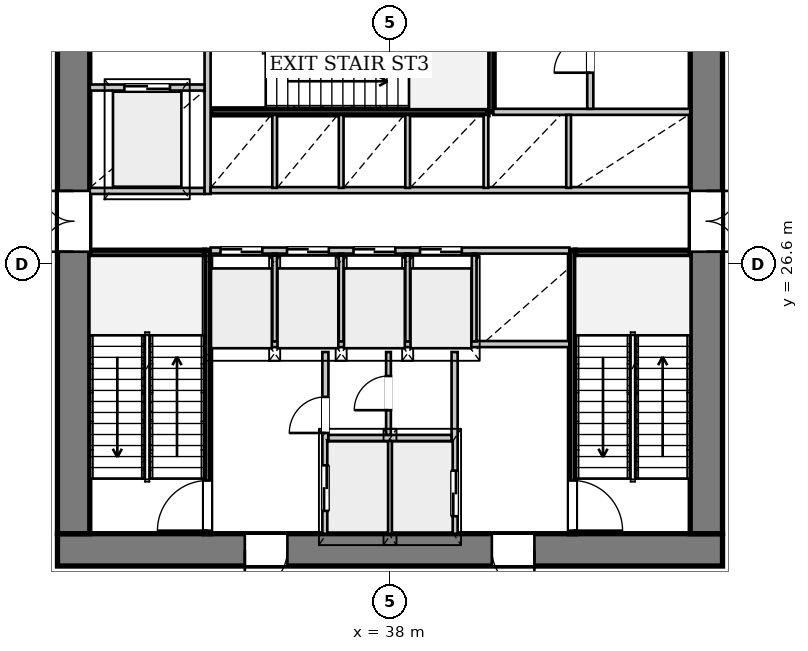
"""IFC4 building model, lengths in metres.
Left out: names, types, materials, properties, quantities, classifications, styles, units other than length and angle.
Written with IfcOpenShell. Run it as: python <this file> out.ifc"""

import sys

from ifc_helpers import new_model, si_unit, direction, frame, frame_2d, origin, place, context, subcontext, project, spatial, rectangle, extrude, source, transform, mapped, element, fill, save


model = new_model("IFC4")
c1 = context("Model", 3, precision=1e-05, world=origin(), true_north=direction((0.0, 1.0)))
c2 = subcontext(c1, "Body", "Model", "MODEL_VIEW")
j1 = project(units=[si_unit("LENGTHUNIT", "METRE"), si_unit("PLANEANGLEUNIT", "RADIAN")], contexts=[c1])
p1 = place(None, origin())
s1 = spatial("IfcSite", under=j1, at=p1, CompositionType="ELEMENT")
p2 = place(p1, origin())
s2 = spatial("IfcBuilding", under=s1, at=p2, CompositionType="ELEMENT")
p3 = place(p2, frame((0.0, 0.0, 24.6)))
s3 = spatial("IfcBuildingStorey", under=s2, at=p3, CompositionType="ELEMENT", Elevation=24.6)
p4 = place(p3, frame((46.75, 19.075, 0.0), z_axis=(0.0, 0.0, 1.0), x_axis=(-1.0, 0.0, 0.0)))
e1 = element("IfcWall", 1, at=p4, inside=s3, PredefinedType="SHEAR", context=c2, shape_type="SweptSolid", body=[
    extrude(rectangle(XDim=17.5, YDim=0.85, at=frame_2d((8.75, 0.0))), origin(), (0.0, 0.0, 1.0), 4.45),
])
p5 = place(p4, frame((4.95, 0.0, 0.0)))
e2 = element("IfcOpeningElement", 2, at=p5, cuts=e1, PredefinedType="OPENING", context=c2, shape_type="SweptSolid", body=[
    extrude(rectangle(XDim=1.12, YDim=2.25, at=frame_2d((0.56, 1.125))), frame((0.0, 0.435, 0.0), z_axis=(0.0, -1.0, 0.0), x_axis=(1.0, 0.0, 0.0)), (0.0, 0.0, 1.0), 0.87),
])
p6 = place(p4, frame((11.45, 0.0, 0.0)))
e3 = element("IfcOpeningElement", 3, at=p6, cuts=e1, PredefinedType="OPENING", context=c2, shape_type="SweptSolid", body=[
    extrude(rectangle(XDim=1.12, YDim=2.25, at=frame_2d((0.56, 1.125))), frame((0.0, 0.435, 0.0), z_axis=(0.0, -1.0, 0.0), x_axis=(1.0, 0.0, 0.0)), (0.0, 0.0, 1.0), 0.87),
])
p7 = place(p3, frame((29.675, 19.5, 0.0), z_axis=(0.0, 0.0, 1.0), x_axis=(0.0, 1.0, 0.0)))
e4 = element("IfcWall", 4, at=p7, inside=s3, PredefinedType="SHEAR", context=c2, shape_type="SweptSolid", body=[
    extrude(rectangle(XDim=14.2, YDim=0.85, at=frame_2d((7.1, 0.0))), origin(), (0.0, 0.0, 1.0), 4.45),
])
p8 = place(p7, frame((7.42, 0.0, 0.0)))
e5 = element("IfcOpeningElement", 5, at=p8, cuts=e4, PredefinedType="OPENING", context=c2, shape_type="SweptSolid", body=[
    extrude(rectangle(XDim=1.6, YDim=2.2, at=frame_2d((0.8, 1.1))), frame((0.0, 0.435, 0.0), z_axis=(0.0, -1.0, 0.0), x_axis=(1.0, 0.0, 0.0)), (0.0, 0.0, 1.0), 0.87),
])
p9 = place(p3, frame((46.325, 33.7, 0.0), z_axis=(0.0, 0.0, 1.0), x_axis=(0.0, -1.0, 0.0)))
e6 = element("IfcWall", 6, at=p9, inside=s3, PredefinedType="SHEAR", context=c2, shape_type="SweptSolid", body=[
    extrude(rectangle(XDim=14.2, YDim=0.85, at=frame_2d((7.1, 0.0))), origin(), (0.0, 0.0, 1.0), 4.45),
])
p10 = place(p9, frame((5.18, 0.0, 0.0)))
e7 = element("IfcOpeningElement", 7, at=p10, cuts=e6, PredefinedType="OPENING", context=c2, shape_type="SweptSolid", body=[
    extrude(rectangle(XDim=1.6, YDim=2.2, at=frame_2d((0.8, 1.1))), frame((0.0, 0.435, 0.0), z_axis=(0.0, -1.0, 0.0), x_axis=(1.0, 0.0, 0.0)), (0.0, 0.0, 1.0), 0.87),
])
p11 = place(p3, frame((33.2, 19.5, 0.0), z_axis=(0.0, 0.0, 1.0), x_axis=(0.0, 1.0, 0.0)))
e8 = element("IfcWall", 8, at=p11, inside=s3, PredefinedType="PARTITIONING", context=c2, shape_type="SweptSolid", body=[
    extrude(rectangle(XDim=7.46, YDim=0.16, at=frame_2d((3.73, 0.0))), origin(), (0.0, 0.0, 1.0), 4.45),
])
p12 = place(p11, frame((0.08, 0.0, 0.0)))
e9 = element("IfcOpeningElement", 9, at=p12, cuts=e8, PredefinedType="OPENING", context=c2, shape_type="SweptSolid", body=[
    extrude(rectangle(XDim=1.32, YDim=2.2, at=frame_2d((0.66, 1.1))), frame((0.0, 0.09, 0.0), z_axis=(0.0, -1.0, 0.0), x_axis=(1.0, 0.0, 0.0)), (0.0, 0.0, 1.0), 0.18),
])
p13 = place(p3, frame((30.1, 26.88, 0.0), z_axis=(0.0, 0.0, 1.0), x_axis=(1.0, 0.0, 0.0)))
e10 = element("IfcWall", 10, at=p13, inside=s3, PredefinedType="PARTITIONING", context=c2, shape_type="SweptSolid", body=[
    extrude(rectangle(XDim=3.02, YDim=0.16, at=frame_2d((1.51, 0.0))), origin(), (0.0, 0.0, 1.0), 4.45),
])
p14 = place(p3, frame((42.8, 26.96, 0.0), z_axis=(0.0, 0.0, 1.0), x_axis=(0.0, -1.0, 0.0)))
e11 = element("IfcWall", 11, at=p14, inside=s3, PredefinedType="PARTITIONING", context=c2, shape_type="SweptSolid", body=[
    extrude(rectangle(XDim=7.46, YDim=0.16, at=frame_2d((3.73, 0.0))), origin(), (0.0, 0.0, 1.0), 4.45),
])
p15 = place(p14, frame((6.06, 0.0, 0.0)))
e12 = element("IfcOpeningElement", 12, at=p15, cuts=e11, PredefinedType="OPENING", context=c2, shape_type="SweptSolid", body=[
    extrude(rectangle(XDim=1.32, YDim=2.2, at=frame_2d((0.66, 1.1))), frame((0.0, 0.09, 0.0), z_axis=(0.0, -1.0, 0.0), x_axis=(1.0, 0.0, 0.0)), (0.0, 0.0, 1.0), 0.18),
])
p16 = place(p3, frame((42.88, 26.88, 0.0), z_axis=(0.0, 0.0, 1.0), x_axis=(1.0, 0.0, 0.0)))
e13 = element("IfcWall", 13, at=p16, inside=s3, PredefinedType="PARTITIONING", context=c2, shape_type="SweptSolid", body=[
    extrude(rectangle(XDim=3.02, YDim=0.16, at=frame_2d((1.51, 0.0))), origin(), (0.0, 0.0, 1.0), 4.45),
])
p17 = place(p3, frame((33.28, 30.6, 0.0), z_axis=(0.0, 0.0, 1.0), x_axis=(1.0, 0.0, 0.0)))
e14 = element("IfcWall", 14, at=p17, inside=s3, PredefinedType="PARTITIONING", context=c2, shape_type="SweptSolid", body=[
    extrude(rectangle(XDim=7.3, YDim=0.16, at=frame_2d((3.65, 0.0))), origin(), (0.0, 0.0, 1.0), 4.45),
])
p18 = place(p3, frame((40.66, 30.6, 0.0), z_axis=(0.0, 0.0, 1.0), x_axis=(0.0, 1.0, 0.0)))
e15 = element("IfcWall", 15, at=p18, inside=s3, PredefinedType="PARTITIONING", context=c2, shape_type="SweptSolid", body=[
    extrude(rectangle(XDim=3.1, YDim=0.16, at=frame_2d((1.55, 0.0))), origin(), (0.0, 0.0, 1.0), 4.45),
])
p19 = place(p3, frame((36.3, 19.5, 0.0), z_axis=(0.0, 0.0, 1.0), x_axis=(0.0, 1.0, 0.0)))
e16 = element("IfcWall", 16, at=p19, inside=s3, PredefinedType="PARTITIONING", context=c2, shape_type="SweptSolid", body=[
    extrude(rectangle(XDim=4.78, YDim=0.16, at=frame_2d((2.39, 0.0))), origin(), (0.0, 0.0, 1.0), 4.45),
])
p20 = place(p19, frame((0.6, 0.0, 0.0)))
e17 = element("IfcOpeningElement", 17, at=p20, cuts=e16, PredefinedType="OPENING", context=c2, shape_type="SweptSolid", body=[
    extrude(rectangle(XDim=1.2, YDim=2.2, at=frame_2d((0.6, 1.1))), frame((0.0, 0.09, 0.0), z_axis=(0.0, -1.0, 0.0), x_axis=(1.0, 0.0, 0.0)), (0.0, 0.0, 1.0), 0.18),
])
p21 = place(p19, frame((2.65, 0.0, 0.0)))
e18 = element("IfcOpeningElement", 18, at=p21, cuts=e16, PredefinedType="OPENING", context=c2, shape_type="SweptSolid", body=[
    extrude(rectangle(XDim=0.95, YDim=2.1, at=frame_2d((0.475, 1.05))), frame((0.0, 0.09, 0.0), z_axis=(0.0, -1.0, 0.0), x_axis=(1.0, 0.0, 0.0)), (0.0, 0.0, 1.0), 0.18),
])
p22 = place(p3, frame((39.7, 24.28, 0.0), z_axis=(0.0, 0.0, 1.0), x_axis=(0.0, -1.0, 0.0)))
e19 = element("IfcWall", 19, at=p22, inside=s3, PredefinedType="PARTITIONING", context=c2, shape_type="SweptSolid", body=[
    extrude(rectangle(XDim=4.78, YDim=0.16, at=frame_2d((2.39, 0.0))), origin(), (0.0, 0.0, 1.0), 4.45),
])
p23 = place(p22, frame((3.12, 0.0, 0.0)))
e20 = element("IfcOpeningElement", 20, at=p23, cuts=e19, PredefinedType="OPENING", context=c2, shape_type="SweptSolid", body=[
    extrude(rectangle(XDim=1.2, YDim=2.2, at=frame_2d((0.6, 1.1))), frame((0.0, 0.09, 0.0), z_axis=(0.0, -1.0, 0.0), x_axis=(1.0, 0.0, 0.0)), (0.0, 0.0, 1.0), 0.18),
])
p24 = place(p3, frame((38.0, 19.5, 0.0), z_axis=(0.0, 0.0, 1.0), x_axis=(0.0, 1.0, 0.0)))
e21 = element("IfcWall", 21, at=p24, inside=s3, PredefinedType="PARTITIONING", context=c2, shape_type="SweptSolid", body=[
    extrude(rectangle(XDim=2.46, YDim=0.125, at=frame_2d((1.23, 0.0))), origin(), (0.0, 0.0, 1.0), 4.45),
])
p25 = place(p3, frame((36.38, 22.02, 0.0), z_axis=(0.0, 0.0, 1.0), x_axis=(1.0, 0.0, 0.0)))
e22 = element("IfcWall", 22, at=p25, inside=s3, PredefinedType="PARTITIONING", context=c2, shape_type="SweptSolid", body=[
    extrude(rectangle(XDim=3.24, YDim=0.16, at=frame_2d((1.62, 0.0))), origin(), (0.0, 0.0, 1.0), 4.45),
])
p26 = place(p3, frame((33.28, 24.49, 0.0), z_axis=(0.0, 0.0, 1.0), x_axis=(1.0, 0.0, 0.0)))
e23 = element("IfcWall", 23, at=p26, inside=s3, PredefinedType="PARTITIONING", context=c2, shape_type="SweptSolid", body=[
    extrude(rectangle(XDim=9.44, YDim=0.16, at=frame_2d((4.72, 0.0))), origin(), (0.0, 0.0, 1.0), 4.45),
])
p27 = place(p3, frame((37.96, 22.1, 0.0), z_axis=(0.0, 0.0, 1.0), x_axis=(0.0, 1.0, 0.0)))
e24 = element("IfcWall", 24, at=p27, inside=s3, PredefinedType="PARTITIONING", context=c2, shape_type="SweptSolid", body=[
    extrude(rectangle(XDim=2.18, YDim=0.125, at=frame_2d((1.09, 0.0))), origin(), (0.0, 0.0, 1.0), 4.45),
])
p28 = place(p27, frame((0.65, 0.0, 0.0)))
e25 = element("IfcOpeningElement", 25, at=p28, cuts=e24, PredefinedType="OPENING", context=c2, shape_type="SweptSolid", body=[
    extrude(rectangle(XDim=0.9, YDim=2.1, at=frame_2d((0.45, 1.05))), frame((0.0, 0.073, 0.0), z_axis=(0.0, -1.0, 0.0), x_axis=(1.0, 0.0, 0.0)), (0.0, 0.0, 1.0), 0.145),
])
p29 = place(p3, frame((30.1, 28.52, 0.0), z_axis=(0.0, 0.0, 1.0), x_axis=(1.0, 0.0, 0.0)))
e26 = element("IfcWall", 26, at=p29, inside=s3, PredefinedType="PARTITIONING", context=c2, shape_type="SweptSolid", body=[
    extrude(rectangle(XDim=3.02, YDim=0.16, at=frame_2d((1.51, 0.0))), origin(), (0.0, 0.0, 1.0), 4.45),
])
p30 = place(p3, frame((33.2, 28.44, 0.0), z_axis=(0.0, 0.0, 1.0), x_axis=(0.0, 1.0, 0.0)))
e27 = element("IfcWall", 27, at=p30, inside=s3, PredefinedType="PARTITIONING", context=c2, shape_type="SweptSolid", body=[
    extrude(rectangle(XDim=5.26, YDim=0.16, at=frame_2d((2.63, 0.0))), origin(), (0.0, 0.0, 1.0), 4.45),
])
p31 = place(p3, frame((30.1, 31.24, 0.0), z_axis=(0.0, 0.0, 1.0), x_axis=(1.0, 0.0, 0.0)))
e28 = element("IfcWall", 28, at=p31, inside=s3, PredefinedType="PARTITIONING", context=c2, shape_type="SweptSolid", body=[
    extrude(rectangle(XDim=3.02, YDim=0.16, at=frame_2d((1.51, 0.0))), origin(), (0.0, 0.0, 1.0), 4.45),
])
p32 = place(p31, frame((0.91, 0.0, 0.0)))
e29 = element("IfcOpeningElement", 29, at=p32, cuts=e28, PredefinedType="OPENING", context=c2, shape_type="SweptSolid", body=[
    extrude(rectangle(XDim=1.2, YDim=2.2, at=frame_2d((0.6, 1.1))), frame((0.0, 0.09, 0.0), z_axis=(0.0, -1.0, 0.0), x_axis=(1.0, 0.0, 0.0)), (0.0, 0.0, 1.0), 0.18),
])
p33 = place(p3, frame((33.28, 26.95, 0.0), z_axis=(0.0, 0.0, 1.0), x_axis=(1.0, 0.0, 0.0)))
e30 = element("IfcWall", 30, at=p33, inside=s3, PredefinedType="PARTITIONING", context=c2, shape_type="SweptSolid", body=[
    extrude(rectangle(XDim=9.44, YDim=0.16, at=frame_2d((4.72, 0.0))), origin(), (0.0, 0.0, 1.0), 4.45),
])
p34 = place(p33, frame((0.26, 0.0, 0.0)))
e31 = element("IfcOpeningElement", 31, at=p34, cuts=e30, PredefinedType="OPENING", context=c2, shape_type="SweptSolid", body=[
    extrude(rectangle(XDim=1.1, YDim=2.2, at=frame_2d((0.55, 1.1))), frame((0.0, 0.09, 0.0), z_axis=(0.0, -1.0, 0.0), x_axis=(1.0, 0.0, 0.0)), (0.0, 0.0, 1.0), 0.18),
])
p35 = place(p33, frame((2.01, 0.0, 0.0)))
e32 = element("IfcOpeningElement", 32, at=p35, cuts=e30, PredefinedType="OPENING", context=c2, shape_type="SweptSolid", body=[
    extrude(rectangle(XDim=1.1, YDim=2.2, at=frame_2d((0.55, 1.1))), frame((0.0, 0.09, 0.0), z_axis=(0.0, -1.0, 0.0), x_axis=(1.0, 0.0, 0.0)), (0.0, 0.0, 1.0), 0.18),
])
p36 = place(p33, frame((3.76, 0.0, 0.0)))
e33 = element("IfcOpeningElement", 33, at=p36, cuts=e30, PredefinedType="OPENING", context=c2, shape_type="SweptSolid", body=[
    extrude(rectangle(XDim=1.1, YDim=2.2, at=frame_2d((0.55, 1.1))), frame((0.0, 0.09, 0.0), z_axis=(0.0, -1.0, 0.0), x_axis=(1.0, 0.0, 0.0)), (0.0, 0.0, 1.0), 0.18),
])
p37 = place(p33, frame((5.51, 0.0, 0.0)))
e34 = element("IfcOpeningElement", 34, at=p37, cuts=e30, PredefinedType="OPENING", context=c2, shape_type="SweptSolid", body=[
    extrude(rectangle(XDim=1.1, YDim=2.2, at=frame_2d((0.55, 1.1))), frame((0.0, 0.09, 0.0), z_axis=(0.0, -1.0, 0.0), x_axis=(1.0, 0.0, 0.0)), (0.0, 0.0, 1.0), 0.18),
])
for number, where, z_axis, x_axis in (
    (35, (34.965, 24.56, 0.0), (0.0, 0.0, 1.0), (0.0, 1.0, 0.0)),
    (36, (36.715, 24.56, 0.0), (0.0, 0.0, 1.0), (0.0, 1.0, 0.0)),
    (37, (38.465, 24.56, 0.0), (0.0, 0.0, 1.0), (0.0, 1.0, 0.0)),
    (38, (40.215, 24.56, 0.0), (0.0, 0.0, 1.0), (0.0, 1.0, 0.0)),
):
    element("IfcWall", number, at=place(p3, frame(where, z_axis=z_axis, x_axis=x_axis)), inside=s3, PredefinedType="PARTITIONING", context=c2, shape_type="SweptSolid", body=[
        extrude(rectangle(XDim=2.31, YDim=0.125, at=frame_2d((1.155, 0.0))), origin(), (0.0, 0.0, 1.0), 4.45),
    ])
p38 = place(p3, frame((33.28, 28.54, 0.0), z_axis=(0.0, 0.0, 1.0), x_axis=(1.0, 0.0, 0.0)))
e39 = element("IfcWall", 39, at=p38, inside=s3, PredefinedType="PARTITIONING", context=c2, shape_type="SweptSolid", body=[
    extrude(rectangle(XDim=12.62, YDim=0.16, at=frame_2d((6.31, 0.0))), origin(), (0.0, 0.0, 1.0), 4.45),
])
p39 = place(p3, frame((40.72, 30.6, 0.0), z_axis=(0.0, 0.0, 1.0), x_axis=(1.0, 0.0, 0.0)))
e40 = element("IfcWall", 40, at=p39, inside=s3, PredefinedType="PARTITIONING", context=c2, shape_type="SweptSolid", body=[
    extrude(rectangle(XDim=5.18, YDim=0.16, at=frame_2d((2.59, 0.0))), origin(), (0.0, 0.0, 1.0), 4.45),
])
for number, where, z_axis, x_axis in (
    (41, (34.965, 28.6, 0.0), (0.0, 0.0, 1.0), (0.0, 1.0, 0.0)),
    (42, (36.715, 28.6, 0.0), (0.0, 0.0, 1.0), (0.0, 1.0, 0.0)),
    (43, (38.465, 28.6, 0.0), (0.0, 0.0, 1.0), (0.0, 1.0, 0.0)),
    (44, (40.525, 28.6, 0.0), (0.0, 0.0, 1.0), (0.0, 1.0, 0.0)),
    (45, (42.7, 28.6, 0.0), (0.0, 0.0, 1.0), (0.0, 1.0, 0.0)),
):
    element("IfcWall", number, at=place(p3, frame(where, z_axis=z_axis, x_axis=x_axis)), inside=s3, PredefinedType="PARTITIONING", context=c2, shape_type="SweptSolid", body=[
        extrude(rectangle(XDim=1.92, YDim=0.125, at=frame_2d((0.96, 0.0))), origin(), (0.0, 0.0, 1.0), 4.45),
    ])
p40 = place(p3, frame((43.27, 30.68, 0.0), z_axis=(0.0, 0.0, 1.0), x_axis=(0.0, 1.0, 0.0)))
e46 = element("IfcWall", 46, at=p40, inside=s3, PredefinedType="PARTITIONING", context=c2, shape_type="SweptSolid", body=[
    extrude(rectangle(XDim=3.02, YDim=0.16, at=frame_2d((1.51, 0.0))), origin(), (0.0, 0.0, 1.0), 4.45),
])
p41 = place(p40, frame((0.95, 0.0, 0.0)))
e47 = element("IfcOpeningElement", 47, at=p41, cuts=e46, PredefinedType="OPENING", context=c2, shape_type="SweptSolid", body=[
    extrude(rectangle(XDim=0.95, YDim=2.1, at=frame_2d((0.475, 1.05))), frame((0.0, 0.09, 0.0), z_axis=(0.0, -1.0, 0.0), x_axis=(1.0, 0.0, 0.0)), (0.0, 0.0, 1.0), 0.18),
])
m1 = source(origin(), c2, "Body", "SweptSolid", [
    extrude(rectangle(XDim=1.12, YDim=2.25, at=frame_2d((0.56, 1.125))), frame((0.0, 0.025, 0.0), z_axis=(0.0, -1.0, 0.0), x_axis=(1.0, 0.0, 0.0)), (0.0, 0.0, 1.0), 0.05),
])
p42 = place(p5, origin())
e48 = element("IfcDoor", 48, at=p42, inside=s3, OperationType="SINGLE_SWING_LEFT", PredefinedType="DOOR", context=c2, shape_type="MappedRepresentation", body=[
    mapped(m1, transform((0.0, 0.0, 0.0), x_axis=(1.0, 0.0, 0.0), y_axis=(0.0, 1.0, 0.0), z_axis=(0.0, 0.0, 1.0), scale=1.0)),
])
fill(e2, e48)
p43 = place(p6, origin())
e49 = element("IfcDoor", 49, at=p43, inside=s3, OperationType="SINGLE_SWING_RIGHT", PredefinedType="DOOR", context=c2, shape_type="MappedRepresentation", body=[
    mapped(m1, transform((0.0, 0.0, 0.0), x_axis=(1.0, 0.0, 0.0), y_axis=(0.0, 1.0, 0.0), z_axis=(0.0, 0.0, 1.0), scale=1.0)),
])
fill(e3, e49)
m2 = source(origin(), c2, "Body", "SweptSolid", [
    extrude(rectangle(XDim=1.6, YDim=2.2, at=frame_2d((0.8, 1.1))), frame((0.0, 0.025, 0.0), z_axis=(0.0, -1.0, 0.0), x_axis=(1.0, 0.0, 0.0)), (0.0, 0.0, 1.0), 0.05),
])
p44 = place(p8, origin())
e50 = element("IfcDoor", 50, at=p44, inside=s3, OperationType="DOUBLE_DOOR_SINGLE_SWING", PredefinedType="DOOR", context=c2, shape_type="MappedRepresentation", body=[
    mapped(m2, transform((0.0, 0.0, 0.0), x_axis=(1.0, 0.0, 0.0), y_axis=(0.0, 1.0, 0.0), z_axis=(0.0, 0.0, 1.0), scale=1.0)),
])
fill(e5, e50)
p45 = place(p10, origin())
e51 = element("IfcDoor", 51, at=p45, inside=s3, OperationType="DOUBLE_DOOR_SINGLE_SWING", PredefinedType="DOOR", context=c2, shape_type="MappedRepresentation", body=[
    mapped(m2, transform((0.0, 0.0, 0.0), x_axis=(1.0, 0.0, 0.0), y_axis=(0.0, 1.0, 0.0), z_axis=(0.0, 0.0, 1.0), scale=1.0)),
])
fill(e7, e51)
m3 = source(origin(), c2, "Body", "SweptSolid", [
    extrude(rectangle(XDim=1.32, YDim=2.2, at=frame_2d((0.66, 1.1))), frame((0.0, 0.025, 0.0), z_axis=(0.0, -1.0, 0.0), x_axis=(1.0, 0.0, 0.0)), (0.0, 0.0, 1.0), 0.05),
])
p46 = place(p12, origin())
e52 = element("IfcDoor", 52, at=p46, inside=s3, OperationType="SINGLE_SWING_LEFT", PredefinedType="DOOR", context=c2, shape_type="MappedRepresentation", body=[
    mapped(m3, transform((0.0, 0.0, 0.0), x_axis=(1.0, 0.0, 0.0), y_axis=(0.0, 1.0, 0.0), z_axis=(0.0, 0.0, 1.0), scale=1.0)),
])
fill(e9, e52)
p47 = place(p15, origin())
e53 = element("IfcDoor", 53, at=p47, inside=s3, OperationType="SINGLE_SWING_RIGHT", PredefinedType="DOOR", context=c2, shape_type="MappedRepresentation", body=[
    mapped(m3, transform((0.0, 0.0, 0.0), x_axis=(1.0, 0.0, 0.0), y_axis=(0.0, 1.0, 0.0), z_axis=(0.0, 0.0, 1.0), scale=1.0)),
])
fill(e12, e53)
m4 = source(origin(), c2, "Body", "SweptSolid", [
    extrude(rectangle(XDim=1.2, YDim=2.2, at=frame_2d((0.6, 1.1))), frame((0.0, 0.025, 0.0), z_axis=(0.0, -1.0, 0.0), x_axis=(1.0, 0.0, 0.0)), (0.0, 0.0, 1.0), 0.05),
])
p48 = place(p20, origin())
e54 = element("IfcDoor", 54, at=p48, inside=s3, OperationType="DOUBLE_DOOR_SLIDING", PredefinedType="DOOR", context=c2, shape_type="MappedRepresentation", body=[
    mapped(m4, transform((0.0, 0.0, 0.0), x_axis=(1.0, 0.0, 0.0), y_axis=(0.0, 1.0, 0.0), z_axis=(0.0, 0.0, 1.0), scale=1.0)),
])
fill(e17, e54)
m5 = source(origin(), c2, "Body", "SweptSolid", [
    extrude(rectangle(XDim=0.95, YDim=2.1, at=frame_2d((0.475, 1.05))), frame((0.0, 0.025, 0.0), z_axis=(0.0, -1.0, 0.0), x_axis=(1.0, 0.0, 0.0)), (0.0, 0.0, 1.0), 0.05),
])
p49 = place(p21, origin())
e55 = element("IfcDoor", 55, at=p49, inside=s3, OperationType="SINGLE_SWING_LEFT", PredefinedType="DOOR", context=c2, shape_type="MappedRepresentation", body=[
    mapped(m5, transform((0.0, 0.0, 0.0), x_axis=(1.0, 0.0, 0.0), y_axis=(0.0, 1.0, 0.0), z_axis=(0.0, 0.0, 1.0), scale=1.0)),
])
fill(e18, e55)
m6 = source(origin(), c2, "Body", "SweptSolid", [
    extrude(rectangle(XDim=0.9, YDim=2.1, at=frame_2d((0.45, 1.05))), frame((0.0, 0.025, 0.0), z_axis=(0.0, -1.0, 0.0), x_axis=(1.0, 0.0, 0.0)), (0.0, 0.0, 1.0), 0.05),
])
p50 = place(p28, origin())
e56 = element("IfcDoor", 56, at=p50, inside=s3, OperationType="SINGLE_SWING_LEFT", PredefinedType="DOOR", context=c2, shape_type="MappedRepresentation", body=[
    mapped(m6, transform((0.0, 0.0, 0.0), x_axis=(1.0, 0.0, 0.0), y_axis=(0.0, 1.0, 0.0), z_axis=(0.0, 0.0, 1.0), scale=1.0)),
])
fill(e25, e56)
p51 = place(p23, origin())
e57 = element("IfcDoor", 57, at=p51, inside=s3, OperationType="DOUBLE_DOOR_SLIDING", PredefinedType="DOOR", context=c2, shape_type="MappedRepresentation", body=[
    mapped(m4, transform((0.0, 0.0, 0.0), x_axis=(1.0, 0.0, 0.0), y_axis=(0.0, 1.0, 0.0), z_axis=(0.0, 0.0, 1.0), scale=1.0)),
])
fill(e20, e57)
p52 = place(p32, origin())
e58 = element("IfcDoor", 58, at=p52, inside=s3, OperationType="DOUBLE_DOOR_SLIDING", PredefinedType="DOOR", context=c2, shape_type="MappedRepresentation", body=[
    mapped(m4, transform((0.0, 0.0, 0.0), x_axis=(1.0, 0.0, 0.0), y_axis=(0.0, 1.0, 0.0), z_axis=(0.0, 0.0, 1.0), scale=1.0)),
])
fill(e29, e58)
m7 = source(origin(), c2, "Body", "SweptSolid", [
    extrude(rectangle(XDim=1.1, YDim=2.2, at=frame_2d((0.55, 1.1))), frame((0.0, 0.025, 0.0), z_axis=(0.0, -1.0, 0.0), x_axis=(1.0, 0.0, 0.0)), (0.0, 0.0, 1.0), 0.05),
])
p53 = place(p34, origin())
e59 = element("IfcDoor", 59, at=p53, inside=s3, OperationType="DOUBLE_DOOR_SLIDING", PredefinedType="DOOR", context=c2, shape_type="MappedRepresentation", body=[
    mapped(m7, transform((0.0, 0.0, 0.0), x_axis=(1.0, 0.0, 0.0), y_axis=(0.0, 1.0, 0.0), z_axis=(0.0, 0.0, 1.0), scale=1.0)),
])
fill(e31, e59)
p54 = place(p35, origin())
e60 = element("IfcDoor", 60, at=p54, inside=s3, OperationType="DOUBLE_DOOR_SLIDING", PredefinedType="DOOR", context=c2, shape_type="MappedRepresentation", body=[
    mapped(m7, transform((0.0, 0.0, 0.0), x_axis=(1.0, 0.0, 0.0), y_axis=(0.0, 1.0, 0.0), z_axis=(0.0, 0.0, 1.0), scale=1.0)),
])
fill(e32, e60)
p55 = place(p36, origin())
e61 = element("IfcDoor", 61, at=p55, inside=s3, OperationType="DOUBLE_DOOR_SLIDING", PredefinedType="DOOR", context=c2, shape_type="MappedRepresentation", body=[
    mapped(m7, transform((0.0, 0.0, 0.0), x_axis=(1.0, 0.0, 0.0), y_axis=(0.0, 1.0, 0.0), z_axis=(0.0, 0.0, 1.0), scale=1.0)),
])
fill(e33, e61)
p56 = place(p37, origin())
e62 = element("IfcDoor", 62, at=p56, inside=s3, OperationType="DOUBLE_DOOR_SLIDING", PredefinedType="DOOR", context=c2, shape_type="MappedRepresentation", body=[
    mapped(m7, transform((0.0, 0.0, 0.0), x_axis=(1.0, 0.0, 0.0), y_axis=(0.0, 1.0, 0.0), z_axis=(0.0, 0.0, 1.0), scale=1.0)),
])
fill(e34, e62)
p57 = place(p41, origin())
e63 = element("IfcDoor", 63, at=p57, inside=s3, OperationType="SINGLE_SWING_LEFT", PredefinedType="DOOR", context=c2, shape_type="MappedRepresentation", body=[
    mapped(m5, transform((0.0, 0.0, 0.0), x_axis=(1.0, 0.0, 0.0), y_axis=(0.0, 1.0, 0.0), z_axis=(0.0, 0.0, 1.0), scale=1.0)),
])
fill(e47, e63)
save(model, sys.argv[1])
